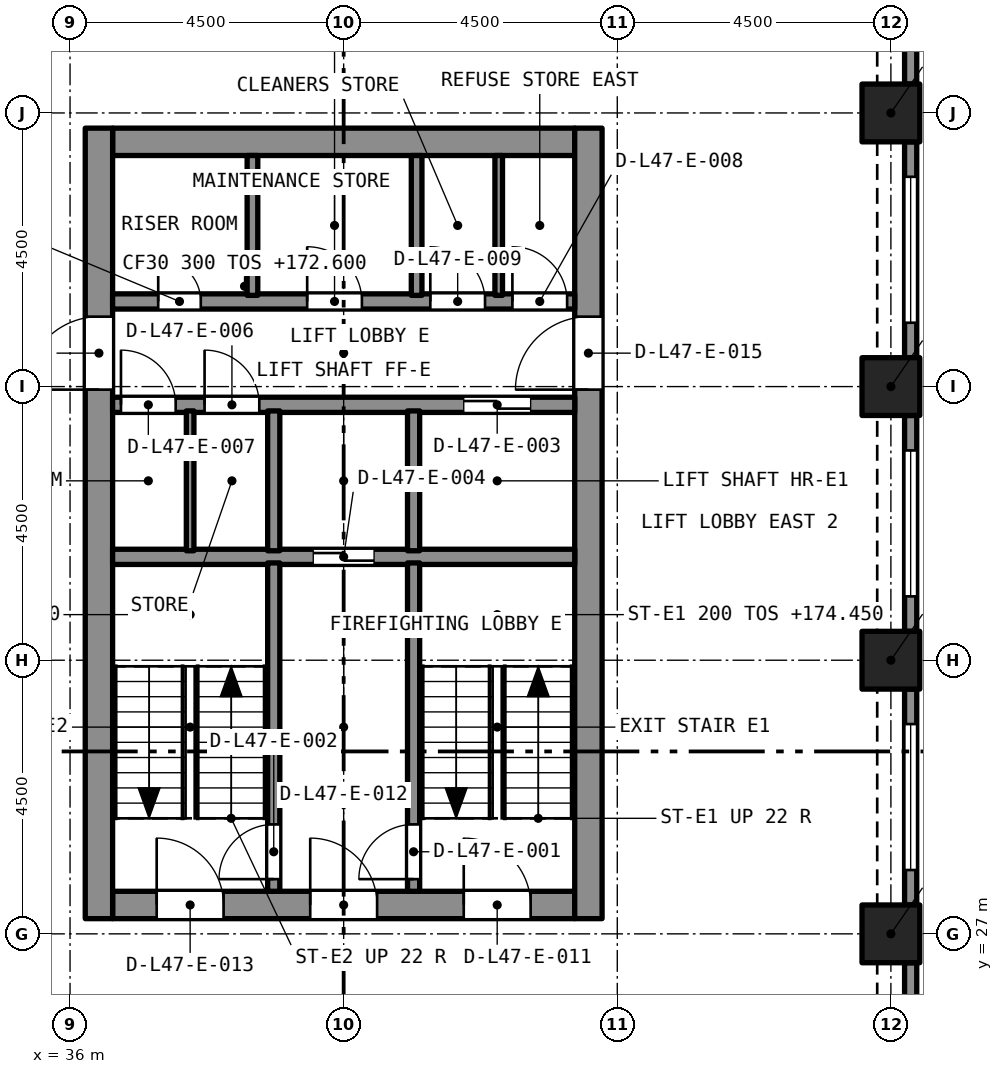
"""IFC4 building model, lengths in metres.
Left out: names, types, materials, properties, quantities, classifications, styles, units other than length and angle.
Written with IfcOpenShell. Run it as: python <this file> out.ifc"""

import sys

from ifc_helpers import new_model, si_unit, direction, frame, frame_2d, origin, origin_2d, place, context, subcontext, project, spatial, rectangle, extrude, element, fill, save


model = new_model("IFC4")
c1 = context("Model", 3, precision=1e-05, world=origin(), true_north=direction((0.0, 1.0)))
c2 = subcontext(c1, "Body", "Model", "MODEL_VIEW")
j1 = project(units=[si_unit("LENGTHUNIT", "METRE"), si_unit("PLANEANGLEUNIT", "RADIAN")], contexts=[c1])
p1 = place(None, origin())
s1 = spatial("IfcSite", under=j1, at=p1, CompositionType="ELEMENT")
p2 = place(p1, origin())
s2 = spatial("IfcBuilding", under=s1, at=p2, CompositionType="ELEMENT")
p3 = place(p2, frame((0.0, 0.0, 172.6)))
s3 = spatial("IfcBuildingStorey", under=s2, at=p3, CompositionType="ELEMENT", Elevation=172.6)
for number, where, z_axis, x_axis in (
    (1, (49.5, 27.0, 0.0), (0.0, 0.0, 1.0), (1.0, 0.0, 0.0)),
    (2, (49.5, 31.5, 0.0), (0.0, 0.0, 1.0), (1.0, 0.0, 0.0)),
    (3, (49.5, 36.0, 0.0), (0.0, 0.0, 1.0), (1.0, 0.0, 0.0)),
    (4, (49.5, 40.5, 0.0), (0.0, 0.0, 1.0), (1.0, 0.0, 0.0)),
):
    element("IfcColumn", number, at=place(p3, frame(where, z_axis=z_axis, x_axis=x_axis)), inside=s3, PredefinedType="COLUMN", context=c2, shape_type="SweptSolid", body=[
        extrude(rectangle(XDim=0.95, YDim=0.95, at=origin_2d()), origin(), (0.0, 0.0, 1.0), 3.7),
    ])
p4 = place(p3, frame((36.7, 27.475, 0.0), z_axis=(0.0, 0.0, 1.0), x_axis=(1.0, 0.0, 0.0)))
e5 = element("IfcWall", 5, at=p4, inside=s3, PredefinedType="SOLIDWALL", context=c2, shape_type="SweptSolid", body=[
    extrude(rectangle(XDim=7.6, YDim=0.45, at=frame_2d((3.8, 0.0))), origin(), (0.0, 0.0, 1.0), 3.7),
])
p5 = place(p4, frame((5.775, 0.0, 0.0)))
e6 = element("IfcOpeningElement", 6, at=p5, cuts=e5, PredefinedType="OPENING", context=c2, shape_type="SweptSolid", body=[
    extrude(rectangle(XDim=1.1, YDim=2.1, at=frame_2d((0.55, 1.05))), frame((0.0, 0.235, 0.0), z_axis=(0.0, -1.0, 0.0), x_axis=(1.0, 0.0, 0.0)), (0.0, 0.0, 1.0), 0.47),
])
p6 = place(p4, frame((3.25, 0.0, 0.0)))
e7 = element("IfcOpeningElement", 7, at=p6, cuts=e5, PredefinedType="OPENING", context=c2, shape_type="SweptSolid", body=[
    extrude(rectangle(XDim=1.1, YDim=2.1, at=frame_2d((0.55, 1.05))), frame((0.0, 0.235, 0.0), z_axis=(0.0, -1.0, 0.0), x_axis=(1.0, 0.0, 0.0)), (0.0, 0.0, 1.0), 0.47),
])
p7 = place(p4, frame((0.725, 0.0, 0.0)))
e8 = element("IfcOpeningElement", 8, at=p7, cuts=e5, PredefinedType="OPENING", context=c2, shape_type="SweptSolid", body=[
    extrude(rectangle(XDim=1.1, YDim=2.1, at=frame_2d((0.55, 1.05))), frame((0.0, 0.235, 0.0), z_axis=(0.0, -1.0, 0.0), x_axis=(1.0, 0.0, 0.0)), (0.0, 0.0, 1.0), 0.47),
])
p8 = place(p3, frame((36.7, 40.025, 0.0), z_axis=(0.0, 0.0, 1.0), x_axis=(1.0, 0.0, 0.0)))
e9 = element("IfcWall", 9, at=p8, inside=s3, PredefinedType="SOLIDWALL", context=c2, shape_type="SweptSolid", body=[
    extrude(rectangle(XDim=7.6, YDim=0.45, at=frame_2d((3.8, 0.0))), origin(), (0.0, 0.0, 1.0), 3.7),
])
p9 = place(p3, frame((36.475, 27.25, 0.0), z_axis=(0.0, 0.0, 1.0), x_axis=(0.0, 1.0, 0.0)))
e10 = element("IfcWall", 10, at=p9, inside=s3, PredefinedType="SOLIDWALL", context=c2, shape_type="SweptSolid", body=[
    extrude(rectangle(XDim=13.0, YDim=0.45, at=frame_2d((6.5, 0.0))), origin(), (0.0, 0.0, 1.0), 3.7),
])
p10 = place(p9, frame((8.7, 0.0, 0.0)))
e11 = element("IfcOpeningElement", 11, at=p10, cuts=e10, PredefinedType="OPENING", context=c2, shape_type="SweptSolid", body=[
    extrude(rectangle(XDim=1.2, YDim=2.1, at=frame_2d((0.6, 1.05))), frame((0.0, 0.235, 0.0), z_axis=(0.0, -1.0, 0.0), x_axis=(1.0, 0.0, 0.0)), (0.0, 0.0, 1.0), 0.47),
])
p11 = place(p3, frame((44.525, 27.25, 0.0), z_axis=(0.0, 0.0, 1.0), x_axis=(0.0, 1.0, 0.0)))
e12 = element("IfcWall", 12, at=p11, inside=s3, PredefinedType="SOLIDWALL", context=c2, shape_type="SweptSolid", body=[
    extrude(rectangle(XDim=13.0, YDim=0.45, at=frame_2d((6.5, 0.0))), origin(), (0.0, 0.0, 1.0), 3.7),
])
p12 = place(p11, frame((8.7, 0.0, 0.0)))
e13 = element("IfcOpeningElement", 13, at=p12, cuts=e12, PredefinedType="OPENING", context=c2, shape_type="SweptSolid", body=[
    extrude(rectangle(XDim=1.2, YDim=2.1, at=frame_2d((0.6, 1.05))), frame((0.0, 0.235, 0.0), z_axis=(0.0, -1.0, 0.0), x_axis=(1.0, 0.0, 0.0)), (0.0, 0.0, 1.0), 0.47),
])
p13 = place(p3, frame((49.825, 26.525, 0.0), z_axis=(0.0, 0.0, 1.0), x_axis=(0.0, -1.0, 0.0)))
e14 = element("IfcWall", 14, at=p13, inside=s3, PredefinedType="SOLIDWALL", context=c2, shape_type="SweptSolid", body=[
    extrude(rectangle(XDim=3.55, YDim=0.2, at=frame_2d((1.775, 0.0))), origin(), (0.0, 0.0, 1.0), 3.7),
])
p14 = place(p13, frame((0.575, 0.0, 0.45)))
e15 = element("IfcOpeningElement", 15, at=p14, cuts=e14, PredefinedType="OPENING", context=c2, shape_type="SweptSolid", body=[
    extrude(rectangle(XDim=2.4, YDim=1.95, at=frame_2d((1.2, 0.975))), frame((0.0, 0.11, 0.0), z_axis=(0.0, -1.0, 0.0), x_axis=(1.0, 0.0, 0.0)), (0.0, 0.0, 1.0), 0.22),
])
p15 = place(p3, frame((49.825, 31.025, 0.0), z_axis=(0.0, 0.0, 1.0), x_axis=(0.0, -1.0, 0.0)))
e16 = element("IfcWall", 16, at=p15, inside=s3, PredefinedType="SOLIDWALL", context=c2, shape_type="SweptSolid", body=[
    extrude(rectangle(XDim=3.55, YDim=0.2, at=frame_2d((1.775, 0.0))), origin(), (0.0, 0.0, 1.0), 3.7),
])
p16 = place(p15, frame((0.575, 0.0, 0.45)))
e17 = element("IfcOpeningElement", 17, at=p16, cuts=e16, PredefinedType="OPENING", context=c2, shape_type="SweptSolid", body=[
    extrude(rectangle(XDim=2.4, YDim=1.95, at=frame_2d((1.2, 0.975))), frame((0.0, 0.11, 0.0), z_axis=(0.0, -1.0, 0.0), x_axis=(1.0, 0.0, 0.0)), (0.0, 0.0, 1.0), 0.22),
])
p17 = place(p3, frame((49.825, 35.525, 0.0), z_axis=(0.0, 0.0, 1.0), x_axis=(0.0, -1.0, 0.0)))
e18 = element("IfcWall", 18, at=p17, inside=s3, PredefinedType="SOLIDWALL", context=c2, shape_type="SweptSolid", body=[
    extrude(rectangle(XDim=3.55, YDim=0.2, at=frame_2d((1.775, 0.0))), origin(), (0.0, 0.0, 1.0), 3.7),
])
p18 = place(p17, frame((0.575, 0.0, 0.45)))
e19 = element("IfcOpeningElement", 19, at=p18, cuts=e18, PredefinedType="OPENING", context=c2, shape_type="SweptSolid", body=[
    extrude(rectangle(XDim=2.4, YDim=1.95, at=frame_2d((1.2, 0.975))), frame((0.0, 0.11, 0.0), z_axis=(0.0, -1.0, 0.0), x_axis=(1.0, 0.0, 0.0)), (0.0, 0.0, 1.0), 0.22),
])
p19 = place(p3, frame((49.825, 40.025, 0.0), z_axis=(0.0, 0.0, 1.0), x_axis=(0.0, -1.0, 0.0)))
e20 = element("IfcWall", 20, at=p19, inside=s3, PredefinedType="SOLIDWALL", context=c2, shape_type="SweptSolid", body=[
    extrude(rectangle(XDim=3.55, YDim=0.2, at=frame_2d((1.775, 0.0))), origin(), (0.0, 0.0, 1.0), 3.7),
])
p20 = place(p19, frame((0.575, 0.0, 0.45)))
e21 = element("IfcOpeningElement", 21, at=p20, cuts=e20, PredefinedType="OPENING", context=c2, shape_type="SweptSolid", body=[
    extrude(rectangle(XDim=2.4, YDim=1.95, at=frame_2d((1.2, 0.975))), frame((0.0, 0.11, 0.0), z_axis=(0.0, -1.0, 0.0), x_axis=(1.0, 0.0, 0.0)), (0.0, 0.0, 1.0), 0.22),
])
p21 = place(p3, frame((49.825, 44.525, 0.0), z_axis=(0.0, 0.0, 1.0), x_axis=(0.0, -1.0, 0.0)))
e22 = element("IfcWall", 22, at=p21, inside=s3, PredefinedType="SOLIDWALL", context=c2, shape_type="SweptSolid", body=[
    extrude(rectangle(XDim=3.55, YDim=0.2, at=frame_2d((1.775, 0.0))), origin(), (0.0, 0.0, 1.0), 3.7),
])
p22 = place(p21, frame((0.575, 0.0, 0.45)))
e23 = element("IfcOpeningElement", 23, at=p22, cuts=e22, PredefinedType="OPENING", context=c2, shape_type="SweptSolid", body=[
    extrude(rectangle(XDim=2.4, YDim=1.95, at=frame_2d((1.2, 0.975))), frame((0.0, 0.11, 0.0), z_axis=(0.0, -1.0, 0.0), x_axis=(1.0, 0.0, 0.0)), (0.0, 0.0, 1.0), 0.22),
])
p23 = place(p3, frame((36.7, 33.2, 0.0), z_axis=(0.0, 0.0, 1.0), x_axis=(1.0, 0.0, 0.0)))
e24 = element("IfcWall", 24, at=p23, inside=s3, PredefinedType="SOLIDWALL", context=c2, shape_type="SweptSolid", body=[
    extrude(rectangle(XDim=7.6, YDim=0.25, at=frame_2d((3.8, 0.0))), origin(), (0.0, 0.0, 1.0), 3.4),
])
p24 = place(p23, frame((3.3, 0.0, 0.0)))
e25 = element("IfcOpeningElement", 25, at=p24, cuts=e24, PredefinedType="OPENING", context=c2, shape_type="SweptSolid", body=[
    extrude(rectangle(XDim=1.0, YDim=2.1, at=frame_2d((0.5, 1.05))), frame((0.0, 0.135, 0.0), z_axis=(0.0, -1.0, 0.0), x_axis=(1.0, 0.0, 0.0)), (0.0, 0.0, 1.0), 0.27),
])
p25 = place(p3, frame((36.7, 35.7, 0.0), z_axis=(0.0, 0.0, 1.0), x_axis=(1.0, 0.0, 0.0)))
e26 = element("IfcWall", 26, at=p25, inside=s3, PredefinedType="SOLIDWALL", context=c2, shape_type="SweptSolid", body=[
    extrude(rectangle(XDim=7.6, YDim=0.25, at=frame_2d((3.8, 0.0))), origin(), (0.0, 0.0, 1.0), 3.4),
])
p26 = place(p25, frame((5.775, 0.0, 0.0)))
e27 = element("IfcOpeningElement", 27, at=p26, cuts=e26, PredefinedType="OPENING", context=c2, shape_type="SweptSolid", body=[
    extrude(rectangle(XDim=1.1, YDim=2.4, at=frame_2d((0.55, 1.2))), frame((0.0, 0.135, 0.0), z_axis=(0.0, -1.0, 0.0), x_axis=(1.0, 0.0, 0.0)), (0.0, 0.0, 1.0), 0.27),
])
p27 = place(p25, frame((1.512, 0.0, 0.0)))
e28 = element("IfcOpeningElement", 28, at=p27, cuts=e26, PredefinedType="OPENING", context=c2, shape_type="SweptSolid", body=[
    extrude(rectangle(XDim=0.9, YDim=2.1, at=frame_2d((0.45, 1.05))), frame((0.0, 0.135, 0.0), z_axis=(0.0, -1.0, 0.0), x_axis=(1.0, 0.0, 0.0)), (0.0, 0.0, 1.0), 0.27),
])
p28 = place(p25, frame((0.137, 0.0, 0.0)))
e29 = element("IfcOpeningElement", 29, at=p28, cuts=e26, PredefinedType="OPENING", context=c2, shape_type="SweptSolid", body=[
    extrude(rectangle(XDim=0.9, YDim=2.1, at=frame_2d((0.45, 1.05))), frame((0.0, 0.135, 0.0), z_axis=(0.0, -1.0, 0.0), x_axis=(1.0, 0.0, 0.0)), (0.0, 0.0, 1.0), 0.27),
])
p29 = place(p3, frame((36.7, 37.4, 0.0), z_axis=(0.0, 0.0, 1.0), x_axis=(1.0, 0.0, 0.0)))
e30 = element("IfcWall", 30, at=p29, inside=s3, PredefinedType="SOLIDWALL", context=c2, shape_type="SweptSolid", body=[
    extrude(rectangle(XDim=7.6, YDim=0.25, at=frame_2d((3.8, 0.0))), origin(), (0.0, 0.0, 1.0), 3.4),
])
p30 = place(p29, frame((0.75, 0.0, 0.0)))
e31 = element("IfcOpeningElement", 31, at=p30, cuts=e30, PredefinedType="OPENING", context=c2, shape_type="SweptSolid", body=[
    extrude(rectangle(XDim=0.7, YDim=2.1, at=frame_2d((0.35, 1.05))), frame((0.0, 0.135, 0.0), z_axis=(0.0, -1.0, 0.0), x_axis=(1.0, 0.0, 0.0)), (0.0, 0.0, 1.0), 0.27),
])
p31 = place(p29, frame((6.575, 0.0, 0.0)))
e32 = element("IfcOpeningElement", 32, at=p31, cuts=e30, PredefinedType="OPENING", context=c2, shape_type="SweptSolid", body=[
    extrude(rectangle(XDim=0.9, YDim=2.1, at=frame_2d((0.45, 1.05))), frame((0.0, 0.135, 0.0), z_axis=(0.0, -1.0, 0.0), x_axis=(1.0, 0.0, 0.0)), (0.0, 0.0, 1.0), 0.27),
])
p32 = place(p29, frame((5.225, 0.0, 0.0)))
e33 = element("IfcOpeningElement", 33, at=p32, cuts=e30, PredefinedType="OPENING", context=c2, shape_type="SweptSolid", body=[
    extrude(rectangle(XDim=0.9, YDim=2.1, at=frame_2d((0.45, 1.05))), frame((0.0, 0.135, 0.0), z_axis=(0.0, -1.0, 0.0), x_axis=(1.0, 0.0, 0.0)), (0.0, 0.0, 1.0), 0.27),
])
p33 = place(p29, frame((3.2, 0.0, 0.0)))
e34 = element("IfcOpeningElement", 34, at=p33, cuts=e30, PredefinedType="OPENING", context=c2, shape_type="SweptSolid", body=[
    extrude(rectangle(XDim=0.9, YDim=2.1, at=frame_2d((0.45, 1.05))), frame((0.0, 0.135, 0.0), z_axis=(0.0, -1.0, 0.0), x_axis=(1.0, 0.0, 0.0)), (0.0, 0.0, 1.0), 0.27),
])
p34 = place(p3, frame((41.65, 27.7, 0.0), z_axis=(0.0, 0.0, 1.0), x_axis=(0.0, 1.0, 0.0)))
e35 = element("IfcWall", 35, at=p34, inside=s3, PredefinedType="SOLIDWALL", context=c2, shape_type="SweptSolid", body=[
    extrude(rectangle(XDim=5.4, YDim=0.2, at=frame_2d((2.7, 0.0))), origin(), (0.0, 0.0, 1.0), 3.4),
])
p35 = place(p34, frame((0.2, 0.0, 0.0)))
e36 = element("IfcOpeningElement", 36, at=p35, cuts=e35, PredefinedType="OPENING", context=c2, shape_type="SweptSolid", body=[
    extrude(rectangle(XDim=0.9, YDim=2.1, at=frame_2d((0.45, 1.05))), frame((0.0, 0.11, 0.0), z_axis=(0.0, -1.0, 0.0), x_axis=(1.0, 0.0, 0.0)), (0.0, 0.0, 1.0), 0.22),
])
p36 = place(p3, frame((39.35, 27.7, 0.0), z_axis=(0.0, 0.0, 1.0), x_axis=(0.0, 1.0, 0.0)))
e37 = element("IfcWall", 37, at=p36, inside=s3, PredefinedType="SOLIDWALL", context=c2, shape_type="SweptSolid", body=[
    extrude(rectangle(XDim=5.4, YDim=0.2, at=frame_2d((2.7, 0.0))), origin(), (0.0, 0.0, 1.0), 3.4),
])
p37 = place(p36, frame((0.2, 0.0, 0.0)))
e38 = element("IfcOpeningElement", 38, at=p37, cuts=e37, PredefinedType="OPENING", context=c2, shape_type="SweptSolid", body=[
    extrude(rectangle(XDim=0.9, YDim=2.1, at=frame_2d((0.45, 1.05))), frame((0.0, 0.11, 0.0), z_axis=(0.0, -1.0, 0.0), x_axis=(1.0, 0.0, 0.0)), (0.0, 0.0, 1.0), 0.22),
])
for number, where, z_axis, x_axis in (
    (39, (41.65, 33.3, 0.0), (0.0, 0.0, 1.0), (0.0, 1.0, 0.0)),
    (40, (39.35, 33.3, 0.0), (0.0, 0.0, 1.0), (0.0, 1.0, 0.0)),
):
    element("IfcWall", number, at=place(p3, frame(where, z_axis=z_axis, x_axis=x_axis)), inside=s3, PredefinedType="SOLIDWALL", context=c2, shape_type="SweptSolid", body=[
        extrude(rectangle(XDim=2.3, YDim=0.2, at=frame_2d((1.15, 0.0))), origin(), (0.0, 0.0, 1.0), 3.4),
    ])
for number, where, z_axis, x_axis in (
    (41, (41.7, 37.5, 0.0), (0.0, 0.0, 1.0), (0.0, 1.0, 0.0)),
    (42, (39.0, 37.5, 0.0), (0.0, 0.0, 1.0), (0.0, 1.0, 0.0)),
):
    element("IfcWall", number, at=place(p3, frame(where, z_axis=z_axis, x_axis=x_axis)), inside=s3, PredefinedType="SOLIDWALL", context=c2, shape_type="SweptSolid", body=[
        extrude(rectangle(XDim=2.3, YDim=0.175, at=frame_2d((1.15, 0.0))), origin(), (0.0, 0.0, 1.0), 3.4),
    ])
for number, where, z_axis, x_axis in (
    (43, (37.975, 33.3, 0.0), (0.0, 0.0, 1.0), (0.0, 1.0, 0.0)),
    (44, (43.05, 37.5, 0.0), (0.0, 0.0, 1.0), (0.0, 1.0, 0.0)),
):
    element("IfcWall", number, at=place(p3, frame(where, z_axis=z_axis, x_axis=x_axis)), inside=s3, PredefinedType="PARTITIONING", context=c2, shape_type="SweptSolid", body=[
        extrude(rectangle(XDim=2.3, YDim=0.125, at=frame_2d((1.15, 0.0))), origin(), (0.0, 0.0, 1.0), 3.4),
    ])
p38 = place(p16, origin())
e45 = element("IfcWindow", 45, at=p38, inside=s3, PartitioningType="SINGLE_PANEL", PredefinedType="WINDOW", context=c2, shape_type="SweptSolid", body=[
    extrude(rectangle(XDim=2.4, YDim=1.95, at=frame_2d((1.2, 0.975))), frame((0.0, 0.03, 0.0), z_axis=(0.0, -1.0, 0.0), x_axis=(1.0, 0.0, 0.0)), (0.0, 0.0, 1.0), 0.06),
])
fill(e17, e45)
p39 = place(p18, origin())
e46 = element("IfcWindow", 46, at=p39, inside=s3, PartitioningType="SINGLE_PANEL", PredefinedType="WINDOW", context=c2, shape_type="SweptSolid", body=[
    extrude(rectangle(XDim=2.4, YDim=1.95, at=frame_2d((1.2, 0.975))), frame((0.0, 0.03, 0.0), z_axis=(0.0, -1.0, 0.0), x_axis=(1.0, 0.0, 0.0)), (0.0, 0.0, 1.0), 0.06),
])
fill(e19, e46)
p40 = place(p20, origin())
e47 = element("IfcWindow", 47, at=p40, inside=s3, PartitioningType="SINGLE_PANEL", PredefinedType="WINDOW", context=c2, shape_type="SweptSolid", body=[
    extrude(rectangle(XDim=2.4, YDim=1.95, at=frame_2d((1.2, 0.975))), frame((0.0, 0.03, 0.0), z_axis=(0.0, -1.0, 0.0), x_axis=(1.0, 0.0, 0.0)), (0.0, 0.0, 1.0), 0.06),
])
fill(e21, e47)
p41 = place(p35, origin())
e48 = element("IfcDoor", 48, at=p41, inside=s3, OperationType="SINGLE_SWING_LEFT", PredefinedType="DOOR", context=c2, shape_type="SweptSolid", body=[
    extrude(rectangle(XDim=0.9, YDim=2.1, at=frame_2d((0.45, 1.05))), frame((0.0, 0.025, 0.0), z_axis=(0.0, -1.0, 0.0), x_axis=(1.0, 0.0, 0.0)), (0.0, 0.0, 1.0), 0.05),
])
fill(e36, e48)
p42 = place(p37, origin())
e49 = element("IfcDoor", 49, at=p42, inside=s3, OperationType="SINGLE_SWING_LEFT", PredefinedType="DOOR", context=c2, shape_type="SweptSolid", body=[
    extrude(rectangle(XDim=0.9, YDim=2.1, at=frame_2d((0.45, 1.05))), frame((0.0, 0.025, 0.0), z_axis=(0.0, -1.0, 0.0), x_axis=(1.0, 0.0, 0.0)), (0.0, 0.0, 1.0), 0.05),
])
fill(e38, e49)
p43 = place(p26, origin())
e50 = element("IfcDoor", 50, at=p43, inside=s3, OperationType="SLIDING_TO_LEFT", PredefinedType="DOOR", context=c2, shape_type="SweptSolid", body=[
    extrude(rectangle(XDim=1.1, YDim=2.4, at=frame_2d((0.55, 1.2))), frame((0.0, 0.025, 0.0), z_axis=(0.0, -1.0, 0.0), x_axis=(1.0, 0.0, 0.0)), (0.0, 0.0, 1.0), 0.05),
])
fill(e27, e50)
p44 = place(p24, origin())
e51 = element("IfcDoor", 51, at=p44, inside=s3, OperationType="SLIDING_TO_LEFT", PredefinedType="DOOR", context=c2, shape_type="SweptSolid", body=[
    extrude(rectangle(XDim=1.0, YDim=2.1, at=frame_2d((0.5, 1.05))), frame((0.0, 0.025, 0.0), z_axis=(0.0, -1.0, 0.0), x_axis=(1.0, 0.0, 0.0)), (0.0, 0.0, 1.0), 0.05),
])
fill(e25, e51)
p45 = place(p30, origin())
e52 = element("IfcDoor", 52, at=p45, inside=s3, OperationType="SINGLE_SWING_LEFT", PredefinedType="DOOR", context=c2, shape_type="SweptSolid", body=[
    extrude(rectangle(XDim=0.7, YDim=2.1, at=frame_2d((0.35, 1.05))), frame((0.0, 0.025, 0.0), z_axis=(0.0, -1.0, 0.0), x_axis=(1.0, 0.0, 0.0)), (0.0, 0.0, 1.0), 0.05),
])
fill(e31, e52)
p46 = place(p27, origin())
e53 = element("IfcDoor", 53, at=p46, inside=s3, OperationType="SINGLE_SWING_LEFT", PredefinedType="DOOR", context=c2, shape_type="SweptSolid", body=[
    extrude(rectangle(XDim=0.9, YDim=2.1, at=frame_2d((0.45, 1.05))), frame((0.0, 0.025, 0.0), z_axis=(0.0, -1.0, 0.0), x_axis=(1.0, 0.0, 0.0)), (0.0, 0.0, 1.0), 0.05),
])
fill(e28, e53)
p47 = place(p28, origin())
e54 = element("IfcDoor", 54, at=p47, inside=s3, OperationType="SINGLE_SWING_LEFT", PredefinedType="DOOR", context=c2, shape_type="SweptSolid", body=[
    extrude(rectangle(XDim=0.9, YDim=2.1, at=frame_2d((0.45, 1.05))), frame((0.0, 0.025, 0.0), z_axis=(0.0, -1.0, 0.0), x_axis=(1.0, 0.0, 0.0)), (0.0, 0.0, 1.0), 0.05),
])
fill(e29, e54)
p48 = place(p31, origin())
e55 = element("IfcDoor", 55, at=p48, inside=s3, OperationType="SINGLE_SWING_LEFT", PredefinedType="DOOR", context=c2, shape_type="SweptSolid", body=[
    extrude(rectangle(XDim=0.9, YDim=2.1, at=frame_2d((0.45, 1.05))), frame((0.0, 0.025, 0.0), z_axis=(0.0, -1.0, 0.0), x_axis=(1.0, 0.0, 0.0)), (0.0, 0.0, 1.0), 0.05),
])
fill(e32, e55)
p49 = place(p32, origin())
e56 = element("IfcDoor", 56, at=p49, inside=s3, OperationType="SINGLE_SWING_LEFT", PredefinedType="DOOR", context=c2, shape_type="SweptSolid", body=[
    extrude(rectangle(XDim=0.9, YDim=2.1, at=frame_2d((0.45, 1.05))), frame((0.0, 0.025, 0.0), z_axis=(0.0, -1.0, 0.0), x_axis=(1.0, 0.0, 0.0)), (0.0, 0.0, 1.0), 0.05),
])
fill(e33, e56)
p50 = place(p33, origin())
e57 = element("IfcDoor", 57, at=p50, inside=s3, OperationType="SINGLE_SWING_LEFT", PredefinedType="DOOR", context=c2, shape_type="SweptSolid", body=[
    extrude(rectangle(XDim=0.9, YDim=2.1, at=frame_2d((0.45, 1.05))), frame((0.0, 0.025, 0.0), z_axis=(0.0, -1.0, 0.0), x_axis=(1.0, 0.0, 0.0)), (0.0, 0.0, 1.0), 0.05),
])
fill(e34, e57)
p51 = place(p5, origin())
e58 = element("IfcDoor", 58, at=p51, inside=s3, OperationType="SINGLE_SWING_LEFT", PredefinedType="DOOR", context=c2, shape_type="SweptSolid", body=[
    extrude(rectangle(XDim=1.1, YDim=2.1, at=frame_2d((0.55, 1.05))), frame((0.0, 0.025, 0.0), z_axis=(0.0, -1.0, 0.0), x_axis=(1.0, 0.0, 0.0)), (0.0, 0.0, 1.0), 0.05),
])
fill(e6, e58)
p52 = place(p6, origin())
e59 = element("IfcDoor", 59, at=p52, inside=s3, OperationType="SINGLE_SWING_LEFT", PredefinedType="DOOR", context=c2, shape_type="SweptSolid", body=[
    extrude(rectangle(XDim=1.1, YDim=2.1, at=frame_2d((0.55, 1.05))), frame((0.0, 0.025, 0.0), z_axis=(0.0, -1.0, 0.0), x_axis=(1.0, 0.0, 0.0)), (0.0, 0.0, 1.0), 0.05),
])
fill(e7, e59)
p53 = place(p7, origin())
e60 = element("IfcDoor", 60, at=p53, inside=s3, OperationType="SINGLE_SWING_LEFT", PredefinedType="DOOR", context=c2, shape_type="SweptSolid", body=[
    extrude(rectangle(XDim=1.1, YDim=2.1, at=frame_2d((0.55, 1.05))), frame((0.0, 0.025, 0.0), z_axis=(0.0, -1.0, 0.0), x_axis=(1.0, 0.0, 0.0)), (0.0, 0.0, 1.0), 0.05),
])
fill(e8, e60)
p54 = place(p10, origin())
e61 = element("IfcDoor", 61, at=p54, inside=s3, OperationType="SINGLE_SWING_LEFT", PredefinedType="DOOR", context=c2, shape_type="SweptSolid", body=[
    extrude(rectangle(XDim=1.2, YDim=2.1, at=frame_2d((0.6, 1.05))), frame((0.0, 0.025, 0.0), z_axis=(0.0, -1.0, 0.0), x_axis=(1.0, 0.0, 0.0)), (0.0, 0.0, 1.0), 0.05),
])
fill(e11, e61)
p55 = place(p12, origin())
e62 = element("IfcDoor", 62, at=p55, inside=s3, OperationType="SINGLE_SWING_LEFT", PredefinedType="DOOR", context=c2, shape_type="SweptSolid", body=[
    extrude(rectangle(XDim=1.2, YDim=2.1, at=frame_2d((0.6, 1.05))), frame((0.0, 0.025, 0.0), z_axis=(0.0, -1.0, 0.0), x_axis=(1.0, 0.0, 0.0)), (0.0, 0.0, 1.0), 0.05),
])
fill(e13, e62)
save(model, sys.argv[1])
